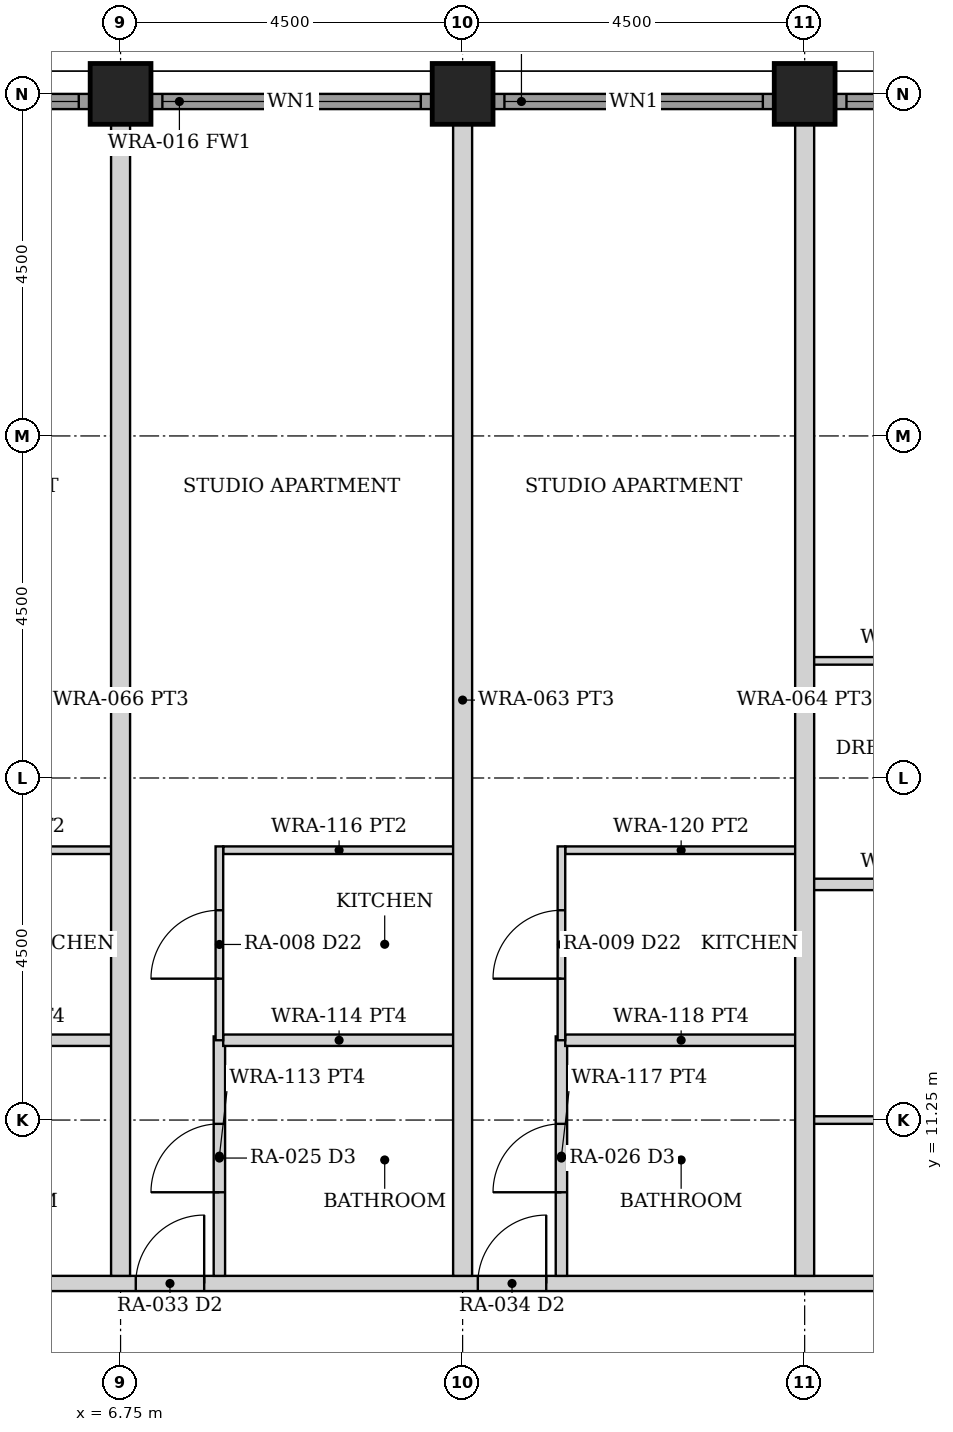
"""IFC4 building model, lengths in metres.
Left out: names, types, materials, properties, quantities, classifications, styles, units other than length and angle.
Written with IfcOpenShell. Run it as: python <this file> out.ifc"""

import sys

from ifc_helpers import new_model, si_unit, direction, frame, frame_2d, origin, origin_2d, place, context, subcontext, project, spatial, rectangle, hollow_rectangle, extrude, element, fill, save


model = new_model("IFC4")
c1 = context("Model", 3, precision=1e-05, world=origin(), true_north=direction((0.0, 1.0)))
c2 = subcontext(c1, "Body", "Model", "MODEL_VIEW")
j1 = project(units=[si_unit("LENGTHUNIT", "METRE"), si_unit("PLANEANGLEUNIT", "RADIAN")], contexts=[c1])
p1 = place(None, origin())
s1 = spatial("IfcSite", under=j1, at=p1, CompositionType="ELEMENT")
p2 = place(p1, origin())
s2 = spatial("IfcBuilding", under=s1, at=p2, CompositionType="ELEMENT")
p3 = place(p2, frame((0.0, 0.0, 30.0)))
s3 = spatial("IfcBuildingStorey", under=s2, at=p3, CompositionType="ELEMENT", Elevation=30.0)
for number, where, z_axis, x_axis in (
    (1, (6.75, 24.75, 0.0), (0.0, 0.0, 1.0), (0.0, 1.0, 0.0)),
    (2, (11.25, 24.75, 0.0), (0.0, 0.0, 1.0), (0.0, 1.0, 0.0)),
    (3, (15.75, 24.75, 0.0), (0.0, 0.0, 1.0), (0.0, 1.0, 0.0)),
):
    element("IfcColumn", number, at=place(p3, frame(where, z_axis=z_axis, x_axis=x_axis)), inside=s3, PredefinedType="COLUMN", context=c2, shape_type="SweptSolid", body=[
        extrude(hollow_rectangle(XDim=0.8, YDim=0.8, WallThickness=0.08, at=origin_2d()), origin(), (0.0, 0.0, 1.0), 3.5),
    ])
p4 = place(p3, frame((2.655, 24.65, 0.0), z_axis=(0.0, 0.0, 1.0), x_axis=(1.0, 0.0, 0.0)))
e4 = element("IfcWall", 4, at=p4, inside=s3, PredefinedType="SOLIDWALL", context=c2, shape_type="SweptSolid", body=[
    extrude(rectangle(XDim=3.69, YDim=0.2, at=frame_2d((1.845, 0.0))), origin(), (0.0, 0.0, 1.0), 2.379),
])
p5 = place(p4, frame((0.145, 0.0, 0.3)))
e5 = element("IfcOpeningElement", 5, at=p5, cuts=e4, PredefinedType="OPENING", context=c2, shape_type="SweptSolid", body=[
    extrude(rectangle(XDim=3.4, YDim=1.929, at=frame_2d((1.7, 0.964))), frame((0.0, 0.11, 0.0), z_axis=(0.0, -1.0, 0.0), x_axis=(1.0, 0.0, 0.0)), (0.0, 0.0, 1.0), 0.22),
])
p6 = place(p3, frame((7.155, 24.65, 0.0), z_axis=(0.0, 0.0, 1.0), x_axis=(1.0, 0.0, 0.0)))
e6 = element("IfcWall", 6, at=p6, inside=s3, PredefinedType="SOLIDWALL", context=c2, shape_type="SweptSolid", body=[
    extrude(rectangle(XDim=3.69, YDim=0.2, at=frame_2d((1.845, 0.0))), origin(), (0.0, 0.0, 1.0), 2.379),
])
p7 = place(p6, frame((0.145, 0.0, 0.3)))
e7 = element("IfcOpeningElement", 7, at=p7, cuts=e6, PredefinedType="OPENING", context=c2, shape_type="SweptSolid", body=[
    extrude(rectangle(XDim=3.4, YDim=1.929, at=frame_2d((1.7, 0.964))), frame((0.0, 0.11, 0.0), z_axis=(0.0, -1.0, 0.0), x_axis=(1.0, 0.0, 0.0)), (0.0, 0.0, 1.0), 0.22),
])
p8 = place(p3, frame((11.655, 24.65, 0.0), z_axis=(0.0, 0.0, 1.0), x_axis=(1.0, 0.0, 0.0)))
e8 = element("IfcWall", 8, at=p8, inside=s3, PredefinedType="SOLIDWALL", context=c2, shape_type="SweptSolid", body=[
    extrude(rectangle(XDim=3.69, YDim=0.2, at=frame_2d((1.845, 0.0))), origin(), (0.0, 0.0, 1.0), 2.379),
])
p9 = place(p8, frame((0.145, 0.0, 0.3)))
e9 = element("IfcOpeningElement", 9, at=p9, cuts=e8, PredefinedType="OPENING", context=c2, shape_type="SweptSolid", body=[
    extrude(rectangle(XDim=3.4, YDim=1.929, at=frame_2d((1.7, 0.964))), frame((0.0, 0.11, 0.0), z_axis=(0.0, -1.0, 0.0), x_axis=(1.0, 0.0, 0.0)), (0.0, 0.0, 1.0), 0.22),
])
p10 = place(p3, frame((16.155, 24.65, 0.0), z_axis=(0.0, 0.0, 1.0), x_axis=(1.0, 0.0, 0.0)))
e10 = element("IfcWall", 10, at=p10, inside=s3, PredefinedType="SOLIDWALL", context=c2, shape_type="SweptSolid", body=[
    extrude(rectangle(XDim=3.69, YDim=0.2, at=frame_2d((1.845, 0.0))), origin(), (0.0, 0.0, 1.0), 2.379),
])
p11 = place(p10, frame((0.145, 0.0, 0.3)))
e11 = element("IfcOpeningElement", 11, at=p11, cuts=e10, PredefinedType="OPENING", context=c2, shape_type="SweptSolid", body=[
    extrude(rectangle(XDim=3.4, YDim=1.929, at=frame_2d((1.7, 0.964))), frame((0.0, 0.11, 0.0), z_axis=(0.0, -1.0, 0.0), x_axis=(1.0, 0.0, 0.0)), (0.0, 0.0, 1.0), 0.22),
])
p12 = place(p3, frame((-24.55, 9.1, 0.0), z_axis=(0.0, 0.0, 1.0), x_axis=(1.0, 0.0, 0.0)))
e12 = element("IfcWall", 12, at=p12, inside=s3, PredefinedType="PARTITIONING", context=c2, shape_type="SweptSolid", body=[
    extrude(rectangle(XDim=49.1, YDim=0.2, at=frame_2d((24.55, 0.0))), origin(), (0.0, 0.0, 1.0), 2.373),
])
p13 = place(p12, frame((5.1, 0.0, 0.0)))
e13 = element("IfcOpeningElement", 13, at=p13, cuts=e12, PredefinedType="OPENING", context=c2, shape_type="SweptSolid", body=[
    extrude(rectangle(XDim=0.9, YDim=2.1, at=frame_2d((0.45, 1.05))), frame((0.0, 0.11, 0.0), z_axis=(0.0, -1.0, 0.0), x_axis=(1.0, 0.0, 0.0)), (0.0, 0.0, 1.0), 0.22),
])
p14 = place(p12, frame((9.0, 0.0, 0.0)))
e14 = element("IfcOpeningElement", 14, at=p14, cuts=e12, PredefinedType="OPENING", context=c2, shape_type="SweptSolid", body=[
    extrude(rectangle(XDim=0.9, YDim=2.1, at=frame_2d((0.45, 1.05))), frame((0.0, 0.11, 0.0), z_axis=(0.0, -1.0, 0.0), x_axis=(1.0, 0.0, 0.0)), (0.0, 0.0, 1.0), 0.22),
])
p15 = place(p12, frame((13.5, 0.0, 0.0)))
e15 = element("IfcOpeningElement", 15, at=p15, cuts=e12, PredefinedType="OPENING", context=c2, shape_type="SweptSolid", body=[
    extrude(rectangle(XDim=0.9, YDim=2.1, at=frame_2d((0.45, 1.05))), frame((0.0, 0.11, 0.0), z_axis=(0.0, -1.0, 0.0), x_axis=(1.0, 0.0, 0.0)), (0.0, 0.0, 1.0), 0.22),
])
p16 = place(p12, frame((18.0, 0.0, 0.0)))
e16 = element("IfcOpeningElement", 16, at=p16, cuts=e12, PredefinedType="OPENING", context=c2, shape_type="SweptSolid", body=[
    extrude(rectangle(XDim=0.9, YDim=2.1, at=frame_2d((0.45, 1.05))), frame((0.0, 0.11, 0.0), z_axis=(0.0, -1.0, 0.0), x_axis=(1.0, 0.0, 0.0)), (0.0, 0.0, 1.0), 0.22),
])
p17 = place(p12, frame((22.5, 0.0, 0.0)))
e17 = element("IfcOpeningElement", 17, at=p17, cuts=e12, PredefinedType="OPENING", context=c2, shape_type="SweptSolid", body=[
    extrude(rectangle(XDim=0.9, YDim=2.1, at=frame_2d((0.45, 1.05))), frame((0.0, 0.11, 0.0), z_axis=(0.0, -1.0, 0.0), x_axis=(1.0, 0.0, 0.0)), (0.0, 0.0, 1.0), 0.22),
])
p18 = place(p12, frame((27.0, 0.0, 0.0)))
e18 = element("IfcOpeningElement", 18, at=p18, cuts=e12, PredefinedType="OPENING", context=c2, shape_type="SweptSolid", body=[
    extrude(rectangle(XDim=0.9, YDim=2.1, at=frame_2d((0.45, 1.05))), frame((0.0, 0.11, 0.0), z_axis=(0.0, -1.0, 0.0), x_axis=(1.0, 0.0, 0.0)), (0.0, 0.0, 1.0), 0.22),
])
p19 = place(p12, frame((31.5, 0.0, 0.0)))
e19 = element("IfcOpeningElement", 19, at=p19, cuts=e12, PredefinedType="OPENING", context=c2, shape_type="SweptSolid", body=[
    extrude(rectangle(XDim=0.9, YDim=2.1, at=frame_2d((0.45, 1.05))), frame((0.0, 0.11, 0.0), z_axis=(0.0, -1.0, 0.0), x_axis=(1.0, 0.0, 0.0)), (0.0, 0.0, 1.0), 0.22),
])
p20 = place(p12, frame((36.0, 0.0, 0.0)))
e20 = element("IfcOpeningElement", 20, at=p20, cuts=e12, PredefinedType="OPENING", context=c2, shape_type="SweptSolid", body=[
    extrude(rectangle(XDim=0.9, YDim=2.1, at=frame_2d((0.45, 1.05))), frame((0.0, 0.11, 0.0), z_axis=(0.0, -1.0, 0.0), x_axis=(1.0, 0.0, 0.0)), (0.0, 0.0, 1.0), 0.22),
])
p21 = place(p12, frame((43.1, 0.0, 0.0)))
e21 = element("IfcOpeningElement", 21, at=p21, cuts=e12, PredefinedType="OPENING", context=c2, shape_type="SweptSolid", body=[
    extrude(rectangle(XDim=0.9, YDim=2.1, at=frame_2d((0.45, 1.05))), frame((0.0, 0.11, 0.0), z_axis=(0.0, -1.0, 0.0), x_axis=(1.0, 0.0, 0.0)), (0.0, 0.0, 1.0), 0.22),
])
p22 = place(p3, frame((3.6, 12.3, 0.0), z_axis=(0.0, 0.0, 1.0), x_axis=(1.0, 0.0, 0.0)))
e22 = element("IfcWall", 22, at=p22, inside=s3, PredefinedType="PARTITIONING", context=c2, shape_type="SweptSolid", body=[
    extrude(rectangle(XDim=3.05, YDim=0.15, at=frame_2d((1.525, 0.0))), origin(), (0.0, 0.0, 1.0), 2.373),
])
p23 = place(p3, frame((3.6, 14.8, 0.0), z_axis=(0.0, 0.0, 1.0), x_axis=(1.0, 0.0, 0.0)))
e23 = element("IfcWall", 23, at=p23, inside=s3, PredefinedType="PARTITIONING", context=c2, shape_type="SweptSolid", body=[
    extrude(rectangle(XDim=3.05, YDim=0.1, at=frame_2d((1.525, 0.0))), origin(), (0.0, 0.0, 1.0), 2.373),
])
p24 = place(p3, frame((8.05, 9.2, 0.0), z_axis=(0.0, 0.0, 1.0), x_axis=(0.0, 1.0, 0.0)))
e24 = element("IfcWall", 24, at=p24, inside=s3, PredefinedType="PARTITIONING", context=c2, shape_type="SweptSolid", body=[
    extrude(rectangle(XDim=3.15, YDim=0.15, at=frame_2d((1.575, 0.0))), origin(), (0.0, 0.0, 1.0), 2.373),
])
p25 = place(p24, frame((1.1, 0.0, 0.0)))
e25 = element("IfcOpeningElement", 25, at=p25, cuts=e24, PredefinedType="OPENING", context=c2, shape_type="SweptSolid", body=[
    extrude(rectangle(XDim=0.9, YDim=2.1, at=frame_2d((0.45, 1.05))), frame((0.0, 0.085, 0.0), z_axis=(0.0, -1.0, 0.0), x_axis=(1.0, 0.0, 0.0)), (0.0, 0.0, 1.0), 0.17),
])
p26 = place(p3, frame((8.1, 12.3, 0.0), z_axis=(0.0, 0.0, 1.0), x_axis=(1.0, 0.0, 0.0)))
e26 = element("IfcWall", 26, at=p26, inside=s3, PredefinedType="PARTITIONING", context=c2, shape_type="SweptSolid", body=[
    extrude(rectangle(XDim=3.05, YDim=0.15, at=frame_2d((1.525, 0.0))), origin(), (0.0, 0.0, 1.0), 2.373),
])
p27 = place(p3, frame((8.1, 14.8, 0.0), z_axis=(0.0, 0.0, 1.0), x_axis=(1.0, 0.0, 0.0)))
e27 = element("IfcWall", 27, at=p27, inside=s3, PredefinedType="PARTITIONING", context=c2, shape_type="SweptSolid", body=[
    extrude(rectangle(XDim=3.05, YDim=0.1, at=frame_2d((1.525, 0.0))), origin(), (0.0, 0.0, 1.0), 2.373),
])
p28 = place(p3, frame((8.05, 12.3, 0.0), z_axis=(0.0, 0.0, 1.0), x_axis=(0.0, 1.0, 0.0)))
e28 = element("IfcWall", 28, at=p28, inside=s3, PredefinedType="PARTITIONING", context=c2, shape_type="SweptSolid", body=[
    extrude(rectangle(XDim=2.55, YDim=0.1, at=frame_2d((1.275, 0.0))), origin(), (0.0, 0.0, 1.0), 2.373),
])
p29 = place(p28, frame((0.81, 0.0, 0.0)))
e29 = element("IfcOpeningElement", 29, at=p29, cuts=e28, PredefinedType="OPENING", context=c2, shape_type="SweptSolid", body=[
    extrude(rectangle(XDim=0.9, YDim=2.1, at=frame_2d((0.45, 1.05))), frame((0.0, 0.06, 0.0), z_axis=(0.0, -1.0, 0.0), x_axis=(1.0, 0.0, 0.0)), (0.0, 0.0, 1.0), 0.12),
])
p30 = place(p3, frame((12.55, 9.2, 0.0), z_axis=(0.0, 0.0, 1.0), x_axis=(0.0, 1.0, 0.0)))
e30 = element("IfcWall", 30, at=p30, inside=s3, PredefinedType="PARTITIONING", context=c2, shape_type="SweptSolid", body=[
    extrude(rectangle(XDim=3.15, YDim=0.15, at=frame_2d((1.575, 0.0))), origin(), (0.0, 0.0, 1.0), 2.373),
])
p31 = place(p30, frame((1.1, 0.0, 0.0)))
e31 = element("IfcOpeningElement", 31, at=p31, cuts=e30, PredefinedType="OPENING", context=c2, shape_type="SweptSolid", body=[
    extrude(rectangle(XDim=0.9, YDim=2.1, at=frame_2d((0.45, 1.05))), frame((0.0, 0.085, 0.0), z_axis=(0.0, -1.0, 0.0), x_axis=(1.0, 0.0, 0.0)), (0.0, 0.0, 1.0), 0.17),
])
p32 = place(p3, frame((12.6, 12.3, 0.0), z_axis=(0.0, 0.0, 1.0), x_axis=(1.0, 0.0, 0.0)))
e32 = element("IfcWall", 32, at=p32, inside=s3, PredefinedType="PARTITIONING", context=c2, shape_type="SweptSolid", body=[
    extrude(rectangle(XDim=3.05, YDim=0.15, at=frame_2d((1.525, 0.0))), origin(), (0.0, 0.0, 1.0), 2.373),
])
p33 = place(p3, frame((12.6, 14.8, 0.0), z_axis=(0.0, 0.0, 1.0), x_axis=(1.0, 0.0, 0.0)))
e33 = element("IfcWall", 33, at=p33, inside=s3, PredefinedType="PARTITIONING", context=c2, shape_type="SweptSolid", body=[
    extrude(rectangle(XDim=3.05, YDim=0.1, at=frame_2d((1.525, 0.0))), origin(), (0.0, 0.0, 1.0), 2.373),
])
p34 = place(p3, frame((12.55, 12.3, 0.0), z_axis=(0.0, 0.0, 1.0), x_axis=(0.0, 1.0, 0.0)))
e34 = element("IfcWall", 34, at=p34, inside=s3, PredefinedType="PARTITIONING", context=c2, shape_type="SweptSolid", body=[
    extrude(rectangle(XDim=2.55, YDim=0.1, at=frame_2d((1.275, 0.0))), origin(), (0.0, 0.0, 1.0), 2.373),
])
p35 = place(p34, frame((0.81, 0.0, 0.0)))
e35 = element("IfcOpeningElement", 35, at=p35, cuts=e34, PredefinedType="OPENING", context=c2, shape_type="SweptSolid", body=[
    extrude(rectangle(XDim=0.9, YDim=2.1, at=frame_2d((0.45, 1.05))), frame((0.0, 0.06, 0.0), z_axis=(0.0, -1.0, 0.0), x_axis=(1.0, 0.0, 0.0)), (0.0, 0.0, 1.0), 0.12),
])
p36 = place(p3, frame((15.85, 11.25, 0.0), z_axis=(0.0, 0.0, 1.0), x_axis=(1.0, 0.0, 0.0)))
e36 = element("IfcWall", 36, at=p36, inside=s3, PredefinedType="PARTITIONING", context=c2, shape_type="SweptSolid", body=[
    extrude(rectangle(XDim=8.5, YDim=0.1, at=frame_2d((4.25, 0.0))), origin(), (0.0, 0.0, 1.0), 2.373),
])
p37 = place(p36, frame((5.225, 0.0, 0.0)))
e37 = element("IfcOpeningElement", 37, at=p37, cuts=e36, PredefinedType="OPENING", context=c2, shape_type="SweptSolid", body=[
    extrude(rectangle(XDim=0.9, YDim=2.1, at=frame_2d((0.45, 1.05))), frame((0.0, 0.06, 0.0), z_axis=(0.0, -1.0, 0.0), x_axis=(1.0, 0.0, 0.0)), (0.0, 0.0, 1.0), 0.12),
])
p38 = place(p36, frame((7.25, 0.0, 0.0)))
e38 = element("IfcOpeningElement", 38, at=p38, cuts=e36, PredefinedType="OPENING", context=c2, shape_type="SweptSolid", body=[
    extrude(rectangle(XDim=0.9, YDim=2.1, at=frame_2d((0.45, 1.05))), frame((0.0, 0.06, 0.0), z_axis=(0.0, -1.0, 0.0), x_axis=(1.0, 0.0, 0.0)), (0.0, 0.0, 1.0), 0.12),
])
p39 = place(p36, frame((3.325, 0.0, 0.0)))
e39 = element("IfcOpeningElement", 39, at=p39, cuts=e36, PredefinedType="OPENING", context=c2, shape_type="SweptSolid", body=[
    extrude(rectangle(XDim=0.85, YDim=2.1, at=frame_2d((0.425, 1.05))), frame((0.0, 0.06, 0.0), z_axis=(0.0, -1.0, 0.0), x_axis=(1.0, 0.0, 0.0)), (0.0, 0.0, 1.0), 0.12),
])
p40 = place(p36, frame((1.08, 0.0, 0.0)))
e40 = element("IfcOpeningElement", 40, at=p40, cuts=e36, PredefinedType="OPENING", context=c2, shape_type="SweptSolid", body=[
    extrude(rectangle(XDim=0.9, YDim=2.1, at=frame_2d((0.45, 1.05))), frame((0.0, 0.06, 0.0), z_axis=(0.0, -1.0, 0.0), x_axis=(1.0, 0.0, 0.0)), (0.0, 0.0, 1.0), 0.12),
])
p41 = place(p3, frame((15.81, 14.35, 0.0), z_axis=(0.0, 0.0, 1.0), x_axis=(1.0, 0.0, 0.0)))
e41 = element("IfcWall", 41, at=p41, inside=s3, PredefinedType="PARTITIONING", context=c2, shape_type="SweptSolid", body=[
    extrude(rectangle(XDim=3.14, YDim=0.15, at=frame_2d((1.57, 0.0))), origin(), (0.0, 0.0, 1.0), 2.373),
])
p42 = place(p3, frame((15.81, 17.291, 0.0), z_axis=(0.0, 0.0, 1.0), x_axis=(1.0, 0.0, 0.0)))
e42 = element("IfcWall", 42, at=p42, inside=s3, PredefinedType="PARTITIONING", context=c2, shape_type="SweptSolid", body=[
    extrude(rectangle(XDim=3.14, YDim=0.1, at=frame_2d((1.57, 0.0))), origin(), (0.0, 0.0, 1.0), 2.373),
])
for number, where, z_axis, x_axis in (
    (43, (6.75, 9.2, 0.0), (0.0, 0.0, 1.0), (0.0, 1.0, 0.0)),
    (44, (11.25, 9.2, 0.0), (0.0, 0.0, 1.0), (0.0, 1.0, 0.0)),
    (45, (15.75, 9.2, 0.0), (0.0, 0.0, 1.0), (0.0, 1.0, 0.0)),
):
    element("IfcWall", number, at=place(p3, frame(where, z_axis=z_axis, x_axis=x_axis)), inside=s3, PredefinedType="PARTITIONING", context=c2, shape_type="SweptSolid", body=[
        extrude(rectangle(XDim=15.15, YDim=0.25, at=frame_2d((7.575, 0.0))), origin(), (0.0, 0.0, 1.0), 2.373),
    ])
p43 = place(p5, origin())
e46 = element("IfcWindow", 46, at=p43, inside=s3, PartitioningType="SINGLE_PANEL", PredefinedType="WINDOW", context=c2, shape_type="SweptSolid", body=[
    extrude(rectangle(XDim=3.4, YDim=1.929, at=frame_2d((1.7, 0.964))), frame((0.0, 0.03, 0.0), z_axis=(0.0, -1.0, 0.0), x_axis=(1.0, 0.0, 0.0)), (0.0, 0.0, 1.0), 0.06),
])
fill(e5, e46)
p44 = place(p7, origin())
e47 = element("IfcWindow", 47, at=p44, inside=s3, PartitioningType="SINGLE_PANEL", PredefinedType="WINDOW", context=c2, shape_type="SweptSolid", body=[
    extrude(rectangle(XDim=3.4, YDim=1.929, at=frame_2d((1.7, 0.964))), frame((0.0, 0.03, 0.0), z_axis=(0.0, -1.0, 0.0), x_axis=(1.0, 0.0, 0.0)), (0.0, 0.0, 1.0), 0.06),
])
fill(e7, e47)
p45 = place(p9, origin())
e48 = element("IfcWindow", 48, at=p45, inside=s3, PartitioningType="SINGLE_PANEL", PredefinedType="WINDOW", context=c2, shape_type="SweptSolid", body=[
    extrude(rectangle(XDim=3.4, YDim=1.929, at=frame_2d((1.7, 0.964))), frame((0.0, 0.03, 0.0), z_axis=(0.0, -1.0, 0.0), x_axis=(1.0, 0.0, 0.0)), (0.0, 0.0, 1.0), 0.06),
])
fill(e9, e48)
p46 = place(p11, origin())
e49 = element("IfcWindow", 49, at=p46, inside=s3, PartitioningType="SINGLE_PANEL", PredefinedType="WINDOW", context=c2, shape_type="SweptSolid", body=[
    extrude(rectangle(XDim=3.4, YDim=1.929, at=frame_2d((1.7, 0.964))), frame((0.0, 0.03, 0.0), z_axis=(0.0, -1.0, 0.0), x_axis=(1.0, 0.0, 0.0)), (0.0, 0.0, 1.0), 0.06),
])
fill(e11, e49)
p47 = place(p19, origin())
e50 = element("IfcDoor", 50, at=p47, inside=s3, OperationType="SINGLE_SWING_RIGHT", PredefinedType="DOOR", context=c2, shape_type="SweptSolid", body=[
    extrude(rectangle(XDim=0.9, YDim=2.1, at=frame_2d((0.45, 1.05))), frame((0.0, 0.025, 0.0), z_axis=(0.0, -1.0, 0.0), x_axis=(1.0, 0.0, 0.0)), (0.0, 0.0, 1.0), 0.05),
])
fill(e19, e50)
p48 = place(p25, origin())
e51 = element("IfcDoor", 51, at=p48, inside=s3, OperationType="SINGLE_SWING_LEFT", PredefinedType="DOOR", context=c2, shape_type="SweptSolid", body=[
    extrude(rectangle(XDim=0.9, YDim=2.1, at=frame_2d((0.45, 1.05))), frame((0.0, 0.025, 0.0), z_axis=(0.0, -1.0, 0.0), x_axis=(1.0, 0.0, 0.0)), (0.0, 0.0, 1.0), 0.05),
])
fill(e25, e51)
p49 = place(p29, origin())
e52 = element("IfcDoor", 52, at=p49, inside=s3, OperationType="SINGLE_SWING_LEFT", PredefinedType="DOOR", context=c2, shape_type="SweptSolid", body=[
    extrude(rectangle(XDim=0.9, YDim=2.1, at=frame_2d((0.45, 1.05))), frame((0.0, 0.025, 0.0), z_axis=(0.0, -1.0, 0.0), x_axis=(1.0, 0.0, 0.0)), (0.0, 0.0, 1.0), 0.05),
])
fill(e29, e52)
p50 = place(p20, origin())
e53 = element("IfcDoor", 53, at=p50, inside=s3, OperationType="SINGLE_SWING_RIGHT", PredefinedType="DOOR", context=c2, shape_type="SweptSolid", body=[
    extrude(rectangle(XDim=0.9, YDim=2.1, at=frame_2d((0.45, 1.05))), frame((0.0, 0.025, 0.0), z_axis=(0.0, -1.0, 0.0), x_axis=(1.0, 0.0, 0.0)), (0.0, 0.0, 1.0), 0.05),
])
fill(e20, e53)
p51 = place(p31, origin())
e54 = element("IfcDoor", 54, at=p51, inside=s3, OperationType="SINGLE_SWING_LEFT", PredefinedType="DOOR", context=c2, shape_type="SweptSolid", body=[
    extrude(rectangle(XDim=0.9, YDim=2.1, at=frame_2d((0.45, 1.05))), frame((0.0, 0.025, 0.0), z_axis=(0.0, -1.0, 0.0), x_axis=(1.0, 0.0, 0.0)), (0.0, 0.0, 1.0), 0.05),
])
fill(e31, e54)
p52 = place(p35, origin())
e55 = element("IfcDoor", 55, at=p52, inside=s3, OperationType="SINGLE_SWING_LEFT", PredefinedType="DOOR", context=c2, shape_type="SweptSolid", body=[
    extrude(rectangle(XDim=0.9, YDim=2.1, at=frame_2d((0.45, 1.05))), frame((0.0, 0.025, 0.0), z_axis=(0.0, -1.0, 0.0), x_axis=(1.0, 0.0, 0.0)), (0.0, 0.0, 1.0), 0.05),
])
fill(e35, e55)
save(model, sys.argv[1])
